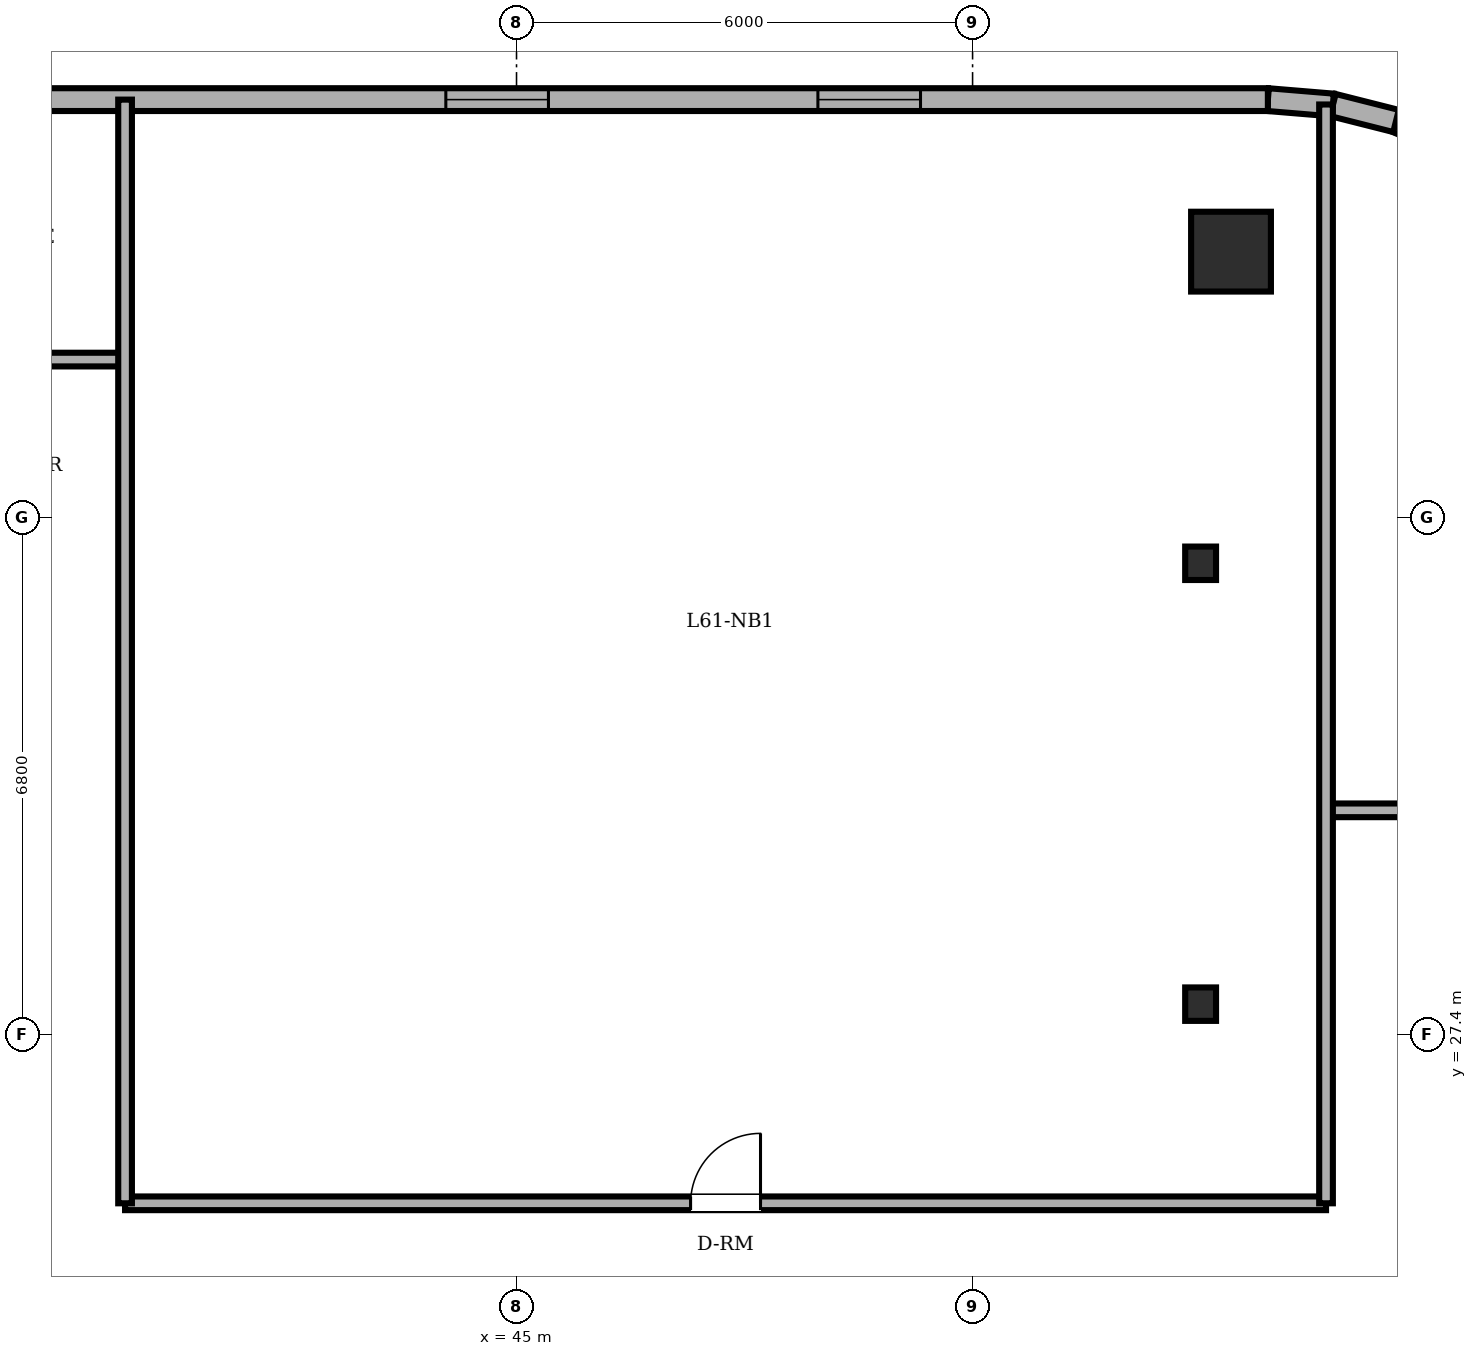
"""IFC4 building model, lengths in metres.
Left out: names, types, materials, properties, quantities, classifications, styles, units other than length and angle.
Written with IfcOpenShell. Run it as: python <this file> out.ifc"""

import sys

from ifc_helpers import new_model, si_unit, direction, frame, frame_2d, origin, origin_2d, place, context, subcontext, project, spatial, rectangle, circle, i_section, extrude, element, fill, save


model = new_model("IFC4")
c1 = context("Model", 3, precision=1e-05, world=origin(), true_north=direction((0.0, 1.0)))
c2 = subcontext(c1, "Body", "Model", "MODEL_VIEW")
j1 = project(units=[si_unit("LENGTHUNIT", "METRE"), si_unit("PLANEANGLEUNIT", "RADIAN")], contexts=[c1])
p1 = place(None, origin())
s1 = spatial("IfcSite", under=j1, at=p1, CompositionType="ELEMENT")
p2 = place(p1, origin())
s2 = spatial("IfcBuilding", under=s1, at=p2, CompositionType="ELEMENT")
p3 = place(p2, frame((0.0, 0.0, 233.7)))
s3 = spatial("IfcBuildingStorey", under=s2, at=p3, CompositionType="ELEMENT", Elevation=233.7)
p4 = place(p3, frame((54.4, 37.7, 0.0), z_axis=(0.0, 0.0, 1.0), x_axis=(1.0, 0.0, 0.0)))
e1 = element("IfcColumn", 1, at=p4, inside=s3, PredefinedType="COLUMN", context=c2, shape_type="SweptSolid", body=[
    extrude(circle(Radius=0.525, at=origin_2d()), origin(), (0.0, 0.0, 1.0), 3.6),
])
for number, where, z_axis, x_axis in (
    (2, (54.0, 27.8, 0.0), (0.0, 0.0, 1.0), (1.0, 0.0, 0.0)),
    (3, (54.0, 33.6, 0.0), (0.0, 0.0, 1.0), (1.0, 0.0, 0.0)),
):
    element("IfcColumn", number, at=place(p3, frame(where, z_axis=z_axis, x_axis=x_axis)), inside=s3, PredefinedType="COLUMN", context=c2, shape_type="SweptSolid", body=[
        extrude(i_section(OverallWidth=0.406, OverallDepth=0.44, WebThickness=0.024, FlangeThickness=0.039, FilletRadius=0.015, at=origin_2d()), origin(), (0.0, 0.0, 1.0), 3.6),
    ])
p5 = place(p3, frame((57.357, 39.075, 0.0), z_axis=(0.0, 0.0, 1.0), x_axis=(-0.916085473636, 0.400983048261, 0.0)))
e4 = element("IfcWall", 4, at=p5, inside=s3, PredefinedType="SOLIDWALL", context=c2, shape_type="SweptSolid", body=[
    extrude(rectangle(XDim=0.858, YDim=0.3, at=frame_2d((0.429, 0.0))), origin(), (0.0, 0.0, 1.0), 3.4),
])
p6 = place(p3, frame((56.571, 39.419, 0.0), z_axis=(0.0, 0.0, 1.0), x_axis=(-0.969536346338, 0.244947490555, 0.0)))
e5 = element("IfcWall", 5, at=p6, inside=s3, PredefinedType="SOLIDWALL", context=c2, shape_type="SweptSolid", body=[
    extrude(rectangle(XDim=0.857, YDim=0.3, at=frame_2d((0.429, 0.0))), origin(), (0.0, 0.0, 1.0), 3.4),
])
p7 = place(p3, frame((55.74, 39.629, 0.0), z_axis=(0.0, 0.0, 1.0), x_axis=(-0.996565355958, 0.082809971041, 0.0)))
e6 = element("IfcWall", 6, at=p7, inside=s3, PredefinedType="SOLIDWALL", context=c2, shape_type="SweptSolid", body=[
    extrude(rectangle(XDim=0.858, YDim=0.3, at=frame_2d((0.429, 0.0))), origin(), (0.0, 0.0, 1.0), 3.4),
])
p8 = place(p3, frame((54.885, 39.7, 0.0), z_axis=(0.0, 0.0, 1.0), x_axis=(-1.0, 0.0, 0.0)))
e7 = element("IfcWall", 7, at=p8, inside=s3, PredefinedType="SOLIDWALL", context=c2, shape_type="SweptSolid", body=[
    extrude(rectangle(XDim=32.485, YDim=0.3, at=frame_2d((16.243, 0.0))), origin(), (0.0, 0.0, 1.0), 3.4),
])
p9 = place(p8, frame((27.685, 0.0, 0.0)))
e8 = element("IfcOpeningElement", 8, at=p9, cuts=e7, PredefinedType="OPENING", context=c2, shape_type="SweptSolid", body=[
    extrude(rectangle(XDim=0.95, YDim=2.2, at=frame_2d((0.475, 1.1))), frame((0.0, 0.16, 0.0), z_axis=(0.0, -1.0, 0.0), x_axis=(1.0, 0.0, 0.0)), (0.0, 0.0, 1.0), 0.32),
])
p10 = place(p8, frame((4.57, 0.0, 0.85)))
e9 = element("IfcOpeningElement", 9, at=p10, cuts=e7, PredefinedType="OPENING", context=c2, shape_type="SweptSolid", body=[
    extrude(rectangle(XDim=1.35, YDim=1.55, at=frame_2d((0.675, 0.775))), frame((0.0, 0.16, 0.0), z_axis=(0.0, -1.0, 0.0), x_axis=(1.0, 0.0, 0.0)), (0.0, 0.0, 1.0), 0.32),
])
p11 = place(p8, frame((9.465, 0.0, 0.85)))
e10 = element("IfcOpeningElement", 10, at=p11, cuts=e7, PredefinedType="OPENING", context=c2, shape_type="SweptSolid", body=[
    extrude(rectangle(XDim=1.35, YDim=1.55, at=frame_2d((0.675, 0.775))), frame((0.0, 0.16, 0.0), z_axis=(0.0, -1.0, 0.0), x_axis=(1.0, 0.0, 0.0)), (0.0, 0.0, 1.0), 0.32),
])
p12 = place(p8, frame((16.577, 0.0, 0.85)))
e11 = element("IfcOpeningElement", 11, at=p12, cuts=e7, PredefinedType="OPENING", context=c2, shape_type="SweptSolid", body=[
    extrude(rectangle(XDim=1.35, YDim=1.55, at=frame_2d((0.675, 0.775))), frame((0.0, 0.16, 0.0), z_axis=(0.0, -1.0, 0.0), x_axis=(1.0, 0.0, 0.0)), (0.0, 0.0, 1.0), 0.32),
])
p13 = place(p8, frame((18.793, 0.0, 0.85)))
e12 = element("IfcOpeningElement", 12, at=p13, cuts=e7, PredefinedType="OPENING", context=c2, shape_type="SweptSolid", body=[
    extrude(rectangle(XDim=1.35, YDim=1.55, at=frame_2d((0.675, 0.775))), frame((0.0, 0.16, 0.0), z_axis=(0.0, -1.0, 0.0), x_axis=(1.0, 0.0, 0.0)), (0.0, 0.0, 1.0), 0.32),
])
p14 = place(p8, frame((22.91, 0.0, 0.85)))
e13 = element("IfcOpeningElement", 13, at=p14, cuts=e7, PredefinedType="OPENING", context=c2, shape_type="SweptSolid", body=[
    extrude(rectangle(XDim=1.35, YDim=1.55, at=frame_2d((0.675, 0.775))), frame((0.0, 0.16, 0.0), z_axis=(0.0, -1.0, 0.0), x_axis=(1.0, 0.0, 0.0)), (0.0, 0.0, 1.0), 0.32),
])
p15 = place(p8, frame((29.835, 0.0, 0.85)))
e14 = element("IfcOpeningElement", 14, at=p15, cuts=e7, PredefinedType="OPENING", context=c2, shape_type="SweptSolid", body=[
    extrude(rectangle(XDim=1.35, YDim=1.55, at=frame_2d((0.675, 0.775))), frame((0.0, 0.16, 0.0), z_axis=(0.0, -1.0, 0.0), x_axis=(1.0, 0.0, 0.0)), (0.0, 0.0, 1.0), 0.32),
])
p16 = place(p3, frame((39.85, 25.18, 0.0), z_axis=(0.0, 0.0, 1.0), x_axis=(1.0, 0.0, 0.0)))
e15 = element("IfcWall", 15, at=p16, inside=s3, PredefinedType="PARTITIONING", context=c2, shape_type="SweptSolid", body=[
    extrude(rectangle(XDim=15.8, YDim=0.18, at=frame_2d((7.9, 0.0))), origin(), (0.0, 0.0, 1.0), 3.4),
])
p17 = place(p16, frame((7.44, 0.0, 0.0)))
e16 = element("IfcOpeningElement", 16, at=p17, cuts=e15, PredefinedType="OPENING", context=c2, shape_type="SweptSolid", body=[
    extrude(rectangle(XDim=0.92, YDim=2.1, at=frame_2d((0.46, 1.05))), frame((0.0, 0.1, 0.0), z_axis=(0.0, -1.0, 0.0), x_axis=(1.0, 0.0, 0.0)), (0.0, 0.0, 1.0), 0.2),
])
p18 = place(p3, frame((55.65, 30.35, 0.0), z_axis=(0.0, 0.0, 1.0), x_axis=(1.0, 0.0, 0.0)))
e17 = element("IfcWall", 17, at=p18, inside=s3, PredefinedType="PARTITIONING", context=c2, shape_type="SweptSolid", body=[
    extrude(rectangle(XDim=12.868, YDim=0.18, at=frame_2d((6.434, 0.0))), origin(), (0.0, 0.0, 1.0), 3.4),
])
p19 = place(p18, frame((0.975, 0.0, 0.0)))
e18 = element("IfcOpeningElement", 18, at=p19, cuts=e17, PredefinedType="OPENING", context=c2, shape_type="SweptSolid", body=[
    extrude(rectangle(XDim=0.92, YDim=2.1, at=frame_2d((0.46, 1.05))), frame((0.0, 0.1, 0.0), z_axis=(0.0, -1.0, 0.0), x_axis=(1.0, 0.0, 0.0)), (0.0, 0.0, 1.0), 0.2),
])
p20 = place(p3, frame((17.677, 36.28, 0.0), z_axis=(0.0, 0.0, 1.0), x_axis=(1.0, 0.0, 0.0)))
e19 = element("IfcWall", 19, at=p20, inside=s3, PredefinedType="PARTITIONING", context=c2, shape_type="SweptSolid", body=[
    extrude(rectangle(XDim=22.173, YDim=0.18, at=frame_2d((11.086, 0.0))), origin(), (0.0, 0.0, 1.0), 3.4),
])
p21 = place(p20, frame((9.573, 0.0, 0.0)))
e20 = element("IfcOpeningElement", 20, at=p21, cuts=e19, PredefinedType="OPENING", context=c2, shape_type="SweptSolid", body=[
    extrude(rectangle(XDim=0.9, YDim=2.1, at=frame_2d((0.45, 1.05))), frame((0.0, 0.1, 0.0), z_axis=(0.0, -1.0, 0.0), x_axis=(1.0, 0.0, 0.0)), (0.0, 0.0, 1.0), 0.2),
])
p22 = place(p20, frame((13.193, 0.0, 0.0)))
e21 = element("IfcOpeningElement", 21, at=p22, cuts=e19, PredefinedType="OPENING", context=c2, shape_type="SweptSolid", body=[
    extrude(rectangle(XDim=0.86, YDim=2.1, at=frame_2d((0.43, 1.05))), frame((0.0, 0.1, 0.0), z_axis=(0.0, -1.0, 0.0), x_axis=(1.0, 0.0, 0.0)), (0.0, 0.0, 1.0), 0.2),
])
p23 = place(p20, frame((4.063, 0.0, 0.0)))
e22 = element("IfcOpeningElement", 22, at=p23, cuts=e19, PredefinedType="OPENING", context=c2, shape_type="SweptSolid", body=[
    extrude(rectangle(XDim=0.92, YDim=2.1, at=frame_2d((0.46, 1.05))), frame((0.0, 0.1, 0.0), z_axis=(0.0, -1.0, 0.0), x_axis=(1.0, 0.0, 0.0)), (0.0, 0.0, 1.0), 0.2),
])
p24 = place(p20, frame((18.128, 0.0, 0.0)))
e23 = element("IfcOpeningElement", 23, at=p24, cuts=e19, PredefinedType="OPENING", context=c2, shape_type="SweptSolid", body=[
    extrude(rectangle(XDim=0.92, YDim=2.1, at=frame_2d((0.46, 1.05))), frame((0.0, 0.1, 0.0), z_axis=(0.0, -1.0, 0.0), x_axis=(1.0, 0.0, 0.0)), (0.0, 0.0, 1.0), 0.2),
])
p25 = place(p3, frame((39.85, 25.18, 0.0), z_axis=(0.0, 0.0, 1.0), x_axis=(0.0, 1.0, 0.0)))
e24 = element("IfcWall", 24, at=p25, inside=s3, PredefinedType="PARTITIONING", context=c2, shape_type="SweptSolid", body=[
    extrude(rectangle(XDim=14.52, YDim=0.18, at=frame_2d((7.26, 0.0))), origin(), (0.0, 0.0, 1.0), 3.4),
])
p26 = place(p3, frame((55.65, 25.18, 0.0), z_axis=(0.0, 0.0, 1.0), x_axis=(0.0, 1.0, 0.0)))
e25 = element("IfcWall", 25, at=p26, inside=s3, PredefinedType="PARTITIONING", context=c2, shape_type="SweptSolid", body=[
    extrude(rectangle(XDim=14.456, YDim=0.18, at=frame_2d((7.228, 0.0))), origin(), (0.0, 0.0, 1.0), 3.4),
])
p27 = place(p10, origin())
e26 = element("IfcWindow", 26, at=p27, inside=s3, PartitioningType="SINGLE_PANEL", PredefinedType="WINDOW", context=c2, shape_type="SweptSolid", body=[
    extrude(rectangle(XDim=1.35, YDim=1.55, at=frame_2d((0.675, 0.775))), frame((0.0, 0.03, 0.0), z_axis=(0.0, -1.0, 0.0), x_axis=(1.0, 0.0, 0.0)), (0.0, 0.0, 1.0), 0.06),
])
fill(e9, e26)
p28 = place(p11, origin())
e27 = element("IfcWindow", 27, at=p28, inside=s3, PartitioningType="SINGLE_PANEL", PredefinedType="WINDOW", context=c2, shape_type="SweptSolid", body=[
    extrude(rectangle(XDim=1.35, YDim=1.55, at=frame_2d((0.675, 0.775))), frame((0.0, 0.03, 0.0), z_axis=(0.0, -1.0, 0.0), x_axis=(1.0, 0.0, 0.0)), (0.0, 0.0, 1.0), 0.06),
])
fill(e10, e27)
p29 = place(p17, origin())
e28 = element("IfcDoor", 28, at=p29, inside=s3, OperationType="SINGLE_SWING_RIGHT", PredefinedType="DOOR", context=c2, shape_type="SweptSolid", body=[
    extrude(rectangle(XDim=0.92, YDim=2.1, at=frame_2d((0.46, 1.05))), frame((0.0, 0.025, 0.0), z_axis=(0.0, -1.0, 0.0), x_axis=(1.0, 0.0, 0.0)), (0.0, 0.0, 1.0), 0.05),
])
fill(e16, e28)
save(model, sys.argv[1])
